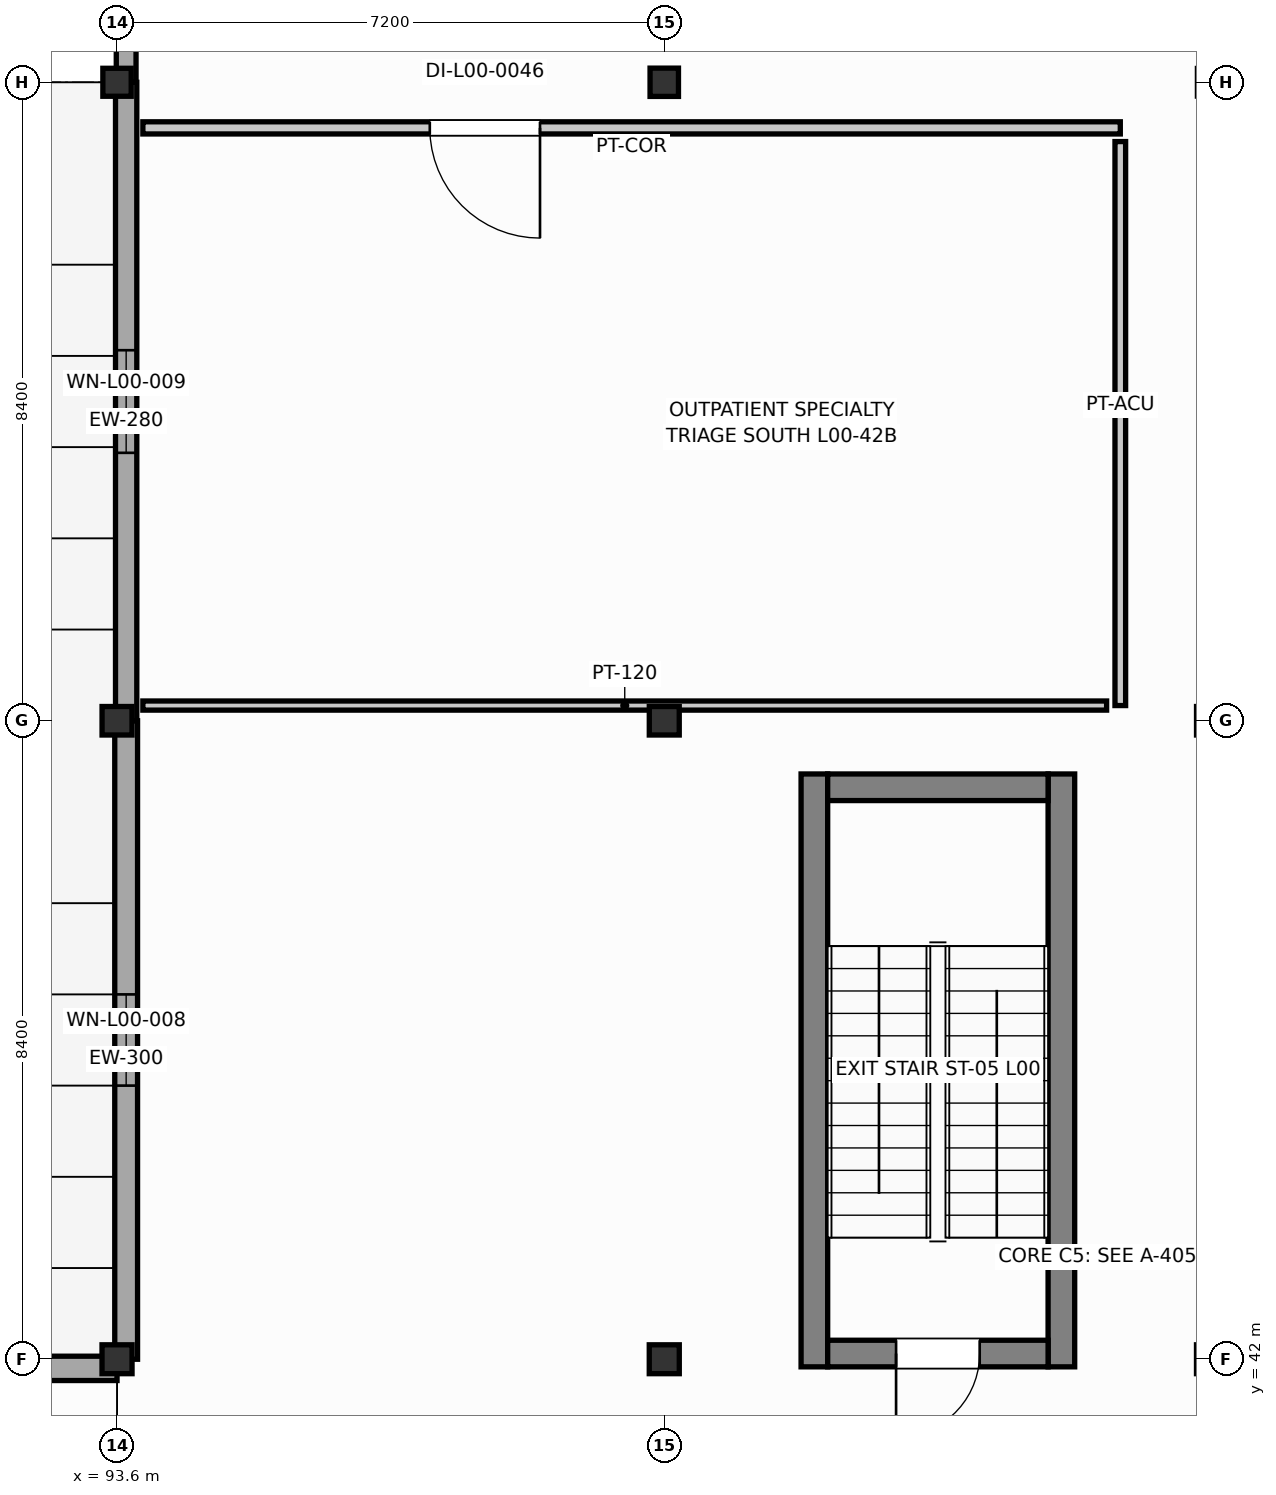
"""IFC4 building model, lengths in metres.
Left out: names, types, materials, properties, quantities, classifications, styles, units other than length and angle.
Written with IfcOpenShell. Run it as: python <this file> out.ifc"""

import sys

from ifc_helpers import new_model, si_unit, direction, frame, frame_2d, origin, origin_2d, place, context, subcontext, project, spatial, rectangle, i_section, extrude, element, fill, save


model = new_model("IFC4")
c1 = context("Model", 3, precision=1e-05, world=origin(), true_north=direction((0.0, 1.0)))
c2 = subcontext(c1, "Body", "Model", "MODEL_VIEW")
j1 = project(units=[si_unit("LENGTHUNIT", "METRE"), si_unit("PLANEANGLEUNIT", "RADIAN")], contexts=[c1])
p1 = place(None, origin())
s1 = spatial("IfcSite", under=j1, at=p1, CompositionType="ELEMENT")
p2 = place(p1, origin())
s2 = spatial("IfcBuilding", under=s1, at=p2, CompositionType="ELEMENT")
p3 = place(p2, origin())
s3 = spatial("IfcBuildingStorey", under=s2, at=p3, CompositionType="ELEMENT", Elevation=0.0)
p4 = place(p3, frame((93.6, 42.0, 0.0), z_axis=(0.0, 0.0, 1.0), x_axis=(1.0, 0.0, 0.0)))
e1 = element("IfcColumn", 1, at=p4, inside=s3, PredefinedType="COLUMN", context=c2, shape_type="SweptSolid", body=[
    extrude(i_section(OverallWidth=0.395, OverallDepth=0.38, WebThickness=0.019, FlangeThickness=0.03, FilletRadius=0.02, at=origin_2d()), origin(), (0.0, 0.0, 1.0), 4.8),
])
p5 = place(p3, frame((93.6, 50.4, 0.0), z_axis=(0.0, 0.0, 1.0), x_axis=(1.0, 0.0, 0.0)))
e2 = element("IfcColumn", 2, at=p5, inside=s3, PredefinedType="COLUMN", context=c2, shape_type="SweptSolid", body=[
    extrude(i_section(OverallWidth=0.394, OverallDepth=0.375, WebThickness=0.017, FlangeThickness=0.028, FilletRadius=0.02, at=origin_2d()), origin(), (0.0, 0.0, 1.0), 4.8),
])
p6 = place(p3, frame((93.6, 58.8, 0.0), z_axis=(0.0, 0.0, 1.0), x_axis=(1.0, 0.0, 0.0)))
e3 = element("IfcColumn", 3, at=p6, inside=s3, PredefinedType="COLUMN", context=c2, shape_type="SweptSolid", body=[
    extrude(i_section(OverallWidth=0.373, OverallDepth=0.368, WebThickness=0.015, FlangeThickness=0.024, FilletRadius=0.02, at=origin_2d()), origin(), (0.0, 0.0, 1.0), 4.8),
])
p7 = place(p3, frame((100.8, 42.0, 0.0), z_axis=(0.0, 0.0, 1.0), x_axis=(1.0, 0.0, 0.0)))
e4 = element("IfcColumn", 4, at=p7, inside=s3, PredefinedType="COLUMN", context=c2, shape_type="SweptSolid", body=[
    extrude(i_section(OverallWidth=0.395, OverallDepth=0.38, WebThickness=0.019, FlangeThickness=0.03, FilletRadius=0.02, at=origin_2d()), origin(), (0.0, 0.0, 1.0), 4.8),
])
p8 = place(p3, frame((100.8, 50.4, 0.0), z_axis=(0.0, 0.0, 1.0), x_axis=(1.0, 0.0, 0.0)))
e5 = element("IfcColumn", 5, at=p8, inside=s3, PredefinedType="COLUMN", context=c2, shape_type="SweptSolid", body=[
    extrude(i_section(OverallWidth=0.394, OverallDepth=0.375, WebThickness=0.017, FlangeThickness=0.028, FilletRadius=0.02, at=origin_2d()), origin(), (0.0, 0.0, 1.0), 4.8),
])
p9 = place(p3, frame((100.8, 58.8, 0.0), z_axis=(0.0, 0.0, 1.0), x_axis=(1.0, 0.0, 0.0)))
e6 = element("IfcColumn", 6, at=p9, inside=s3, PredefinedType="COLUMN", context=c2, shape_type="SweptSolid", body=[
    extrude(i_section(OverallWidth=0.374, OverallDepth=0.372, WebThickness=0.016, FlangeThickness=0.026, FilletRadius=0.02, at=origin_2d()), origin(), (0.0, 0.0, 1.0), 4.8),
])
for number, where, z_axis, x_axis in (
    (7, (102.775, 41.9, 0.0), (0.0, 0.0, 1.0), (0.0, 1.0, 0.0)),
    (8, (106.025, 41.9, 0.0), (0.0, 0.0, 1.0), (0.0, 1.0, 0.0)),
):
    element("IfcWall", number, at=place(p3, frame(where, z_axis=z_axis, x_axis=x_axis)), inside=s3, PredefinedType="SHEAR", context=c2, shape_type="SweptSolid", body=[
        extrude(rectangle(XDim=7.8, YDim=0.35, at=frame_2d((3.9, 0.0))), origin(), (0.0, 0.0, 1.0), 4.58),
    ])
p10 = place(p3, frame((102.95, 49.525, 0.0), z_axis=(0.0, 0.0, 1.0), x_axis=(1.0, 0.0, 0.0)))
e9 = element("IfcWall", 9, at=p10, inside=s3, PredefinedType="SHEAR", context=c2, shape_type="SweptSolid", body=[
    extrude(rectangle(XDim=2.9, YDim=0.35, at=frame_2d((1.45, 0.0))), origin(), (0.0, 0.0, 1.0), 4.58),
])
p11 = place(p3, frame((102.95, 42.075, 0.0), z_axis=(0.0, 0.0, 1.0), x_axis=(1.0, 0.0, 0.0)))
e10 = element("IfcWall", 10, at=p11, inside=s3, PredefinedType="SHEAR", context=c2, shape_type="SweptSolid", body=[
    extrude(rectangle(XDim=2.9, YDim=0.35, at=frame_2d((1.45, 0.0))), origin(), (0.0, 0.0, 1.0), 4.58),
])
p12 = place(p11, frame((0.9, 0.0, 0.0)))
e11 = element("IfcOpeningElement", 11, at=p12, cuts=e10, PredefinedType="OPENING", context=c2, shape_type="SweptSolid", body=[
    extrude(rectangle(XDim=1.1, YDim=2.15, at=frame_2d((0.55, 1.075))), frame((0.0, 0.185, 0.0), z_axis=(0.0, -1.0, 0.0), x_axis=(1.0, 0.0, 0.0)), (0.0, 0.0, 1.0), 0.37),
])
p13 = place(p3, frame((86.4, 41.88, 0.0), z_axis=(0.0, 0.0, 1.0), x_axis=(1.0, 0.0, 0.0)))
e12 = element("IfcWall", 12, at=p13, inside=s3, PredefinedType="SOLIDWALL", context=c2, shape_type="SweptSolid", body=[
    extrude(rectangle(XDim=7.2, YDim=0.32, at=frame_2d((3.6, 0.0))), origin(), (0.0, 0.0, 1.0), 4.129),
])
p14 = place(p13, frame((3.0, 0.0, 0.95)))
e13 = element("IfcOpeningElement", 13, at=p14, cuts=e12, PredefinedType="OPENING", context=c2, shape_type="SweptSolid", body=[
    extrude(rectangle(XDim=1.2, YDim=1.55, at=frame_2d((0.6, 0.775))), frame((0.0, 0.17, 0.0), z_axis=(0.0, -1.0, 0.0), x_axis=(1.0, 0.0, 0.0)), (0.0, 0.0, 1.0), 0.34),
])
p15 = place(p3, frame((93.72, 42.0, 0.0), z_axis=(0.0, 0.0, 1.0), x_axis=(0.0, 1.0, 0.0)))
e14 = element("IfcWall", 14, at=p15, inside=s3, PredefinedType="SOLIDWALL", context=c2, shape_type="SweptSolid", body=[
    extrude(rectangle(XDim=8.4, YDim=0.3, at=frame_2d((4.2, 0.0))), origin(), (0.0, 0.0, 1.0), 3.772),
])
p16 = place(p15, frame((3.6, 0.0, 0.95)))
e15 = element("IfcOpeningElement", 15, at=p16, cuts=e14, PredefinedType="OPENING", context=c2, shape_type="SweptSolid", body=[
    extrude(rectangle(XDim=1.2, YDim=1.75, at=frame_2d((0.6, 0.875))), frame((0.0, 0.16, 0.0), z_axis=(0.0, -1.0, 0.0), x_axis=(1.0, 0.0, 0.0)), (0.0, 0.0, 1.0), 0.32),
])
p17 = place(p3, frame((93.72, 50.4, 0.0), z_axis=(0.0, 0.0, 1.0), x_axis=(0.0, 1.0, 0.0)))
e16 = element("IfcWall", 16, at=p17, inside=s3, PredefinedType="SOLIDWALL", context=c2, shape_type="SweptSolid", body=[
    extrude(rectangle(XDim=8.4, YDim=0.28, at=frame_2d((4.2, 0.0))), origin(), (0.0, 0.0, 1.0), 3.849),
])
p18 = place(p17, frame((3.525, 0.0, 0.95)))
e17 = element("IfcOpeningElement", 17, at=p18, cuts=e16, PredefinedType="OPENING", context=c2, shape_type="SweptSolid", body=[
    extrude(rectangle(XDim=1.35, YDim=1.15, at=frame_2d((0.675, 0.575))), frame((0.0, 0.15, 0.0), z_axis=(0.0, -1.0, 0.0), x_axis=(1.0, 0.0, 0.0)), (0.0, 0.0, 1.0), 0.3),
])
p19 = place(p3, frame((93.72, 58.8, 0.0), z_axis=(0.0, 0.0, 1.0), x_axis=(0.0, 1.0, 0.0)))
e18 = element("IfcWall", 18, at=p19, inside=s3, PredefinedType="SOLIDWALL", context=c2, shape_type="SweptSolid", body=[
    extrude(rectangle(XDim=8.4, YDim=0.26, at=frame_2d((4.2, 0.0))), origin(), (0.0, 0.0, 1.0), 3.925),
])
p20 = place(p19, frame((3.3, 0.0, 0.0)))
e19 = element("IfcOpeningElement", 19, at=p20, cuts=e18, PredefinedType="OPENING", context=c2, shape_type="SweptSolid", body=[
    extrude(rectangle(XDim=1.8, YDim=2.2, at=frame_2d((0.9, 1.1))), frame((0.0, 0.14, 0.0), z_axis=(0.0, -1.0, 0.0), x_axis=(1.0, 0.0, 0.0)), (0.0, 0.0, 1.0), 0.28),
])
p21 = place(p3, frame((93.94, 58.2, 0.0), z_axis=(0.0, 0.0, 1.0), x_axis=(1.0, 0.0, 0.0)))
e20 = element("IfcWall", 20, at=p21, inside=s3, PredefinedType="PARTITIONING", context=c2, shape_type="SweptSolid", body=[
    extrude(rectangle(XDim=12.86, YDim=0.16, at=frame_2d((6.43, 0.0))), origin(), (0.0, 0.0, 1.0), 4.079),
])
p22 = place(p21, frame((3.775, 0.0, 0.0)))
e21 = element("IfcOpeningElement", 21, at=p22, cuts=e20, PredefinedType="OPENING", context=c2, shape_type="SweptSolid", body=[
    extrude(rectangle(XDim=1.45, YDim=2.2, at=frame_2d((0.725, 1.1))), frame((0.0, 0.09, 0.0), z_axis=(0.0, -1.0, 0.0), x_axis=(1.0, 0.0, 0.0)), (0.0, 0.0, 1.0), 0.18),
])
p23 = place(p3, frame((106.8, 58.02, 0.0), z_axis=(0.0, 0.0, 1.0), x_axis=(0.0, -1.0, 0.0)))
e22 = element("IfcWall", 22, at=p23, inside=s3, PredefinedType="PARTITIONING", context=c2, shape_type="SweptSolid", body=[
    extrude(rectangle(XDim=7.42, YDim=0.14, at=frame_2d((3.71, 0.0))), origin(), (0.0, 0.0, 1.0), 4.008),
])
p24 = place(p3, frame((106.62, 50.6, 0.0), z_axis=(0.0, 0.0, 1.0), x_axis=(-1.0, 0.0, 0.0)))
e23 = element("IfcWall", 23, at=p24, inside=s3, PredefinedType="PARTITIONING", context=c2, shape_type="SweptSolid", body=[
    extrude(rectangle(XDim=12.68, YDim=0.12, at=frame_2d((6.34, 0.0))), origin(), (0.0, 0.0, 1.0), 4.001),
])
p25 = place(p12, frame((1.1, 0.0, 0.0), z_axis=(0.0, 0.0, 1.0), x_axis=(-1.0, 0.0, 0.0)))
e24 = element("IfcDoor", 24, at=p25, inside=s3, OperationType="SINGLE_SWING_RIGHT", PredefinedType="DOOR", context=c2, shape_type="SweptSolid", body=[
    extrude(rectangle(XDim=1.1, YDim=2.15, at=frame_2d((0.55, 1.075))), frame((0.0, 0.025, 0.0), z_axis=(0.0, -1.0, 0.0), x_axis=(1.0, 0.0, 0.0)), (0.0, 0.0, 1.0), 0.05),
])
fill(e11, e24)
p26 = place(p16, origin())
e25 = element("IfcWindow", 25, at=p26, inside=s3, PartitioningType="SINGLE_PANEL", PredefinedType="WINDOW", context=c2, shape_type="SweptSolid", body=[
    extrude(rectangle(XDim=1.2, YDim=1.75, at=frame_2d((0.6, 0.875))), frame((0.0, 0.03, 0.0), z_axis=(0.0, -1.0, 0.0), x_axis=(1.0, 0.0, 0.0)), (0.0, 0.0, 1.0), 0.06),
])
fill(e15, e25)
p27 = place(p18, origin())
e26 = element("IfcWindow", 26, at=p27, inside=s3, PartitioningType="SINGLE_PANEL", PredefinedType="WINDOW", context=c2, shape_type="SweptSolid", body=[
    extrude(rectangle(XDim=1.35, YDim=1.15, at=frame_2d((0.675, 0.575))), frame((0.0, 0.03, 0.0), z_axis=(0.0, -1.0, 0.0), x_axis=(1.0, 0.0, 0.0)), (0.0, 0.0, 1.0), 0.06),
])
fill(e17, e26)
p28 = place(p22, frame((1.45, 0.0, 0.0), z_axis=(0.0, 0.0, 1.0), x_axis=(-1.0, 0.0, 0.0)))
e27 = element("IfcDoor", 27, at=p28, inside=s3, OperationType="SINGLE_SWING_LEFT", PredefinedType="DOOR", context=c2, shape_type="SweptSolid", body=[
    extrude(rectangle(XDim=1.45, YDim=2.2, at=frame_2d((0.725, 1.1))), frame((0.0, 0.025, 0.0), z_axis=(0.0, -1.0, 0.0), x_axis=(1.0, 0.0, 0.0)), (0.0, 0.0, 1.0), 0.05),
])
fill(e21, e27)
save(model, sys.argv[1])
